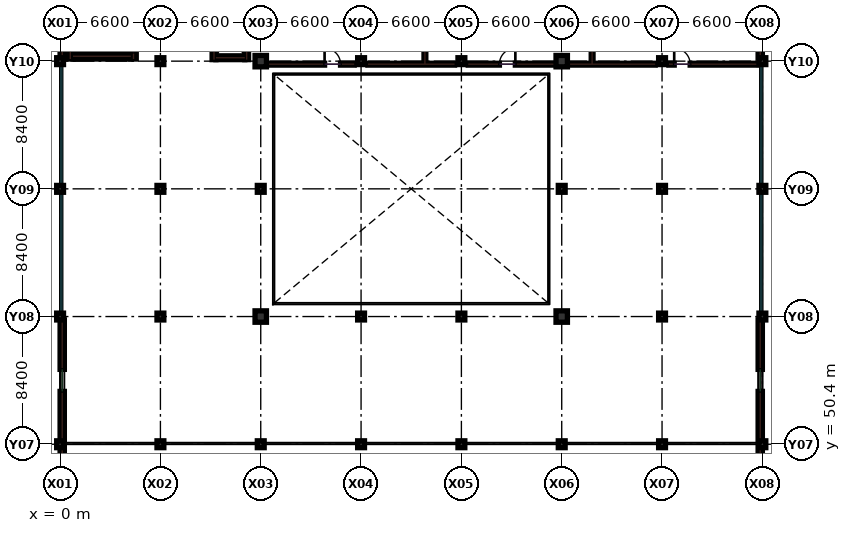
"""IFC4 building model, lengths in metres.
Left out: names, types, materials, properties, quantities, classifications, styles, units other than length and angle.
Written with IfcOpenShell. Run it as: python <this file> out.ifc"""

import sys

from ifc_helpers import new_model, si_unit, direction, frame, frame_2d, origin, origin_2d, place, context, subcontext, project, spatial, rectangle, circle, extrude, element, fill, save


model = new_model("IFC4")
c1 = context("Model", 3, precision=1e-05, world=origin(), true_north=direction((0.0, 1.0)))
c2 = subcontext(c1, "Body", "Model", "MODEL_VIEW")
j1 = project(units=[si_unit("LENGTHUNIT", "METRE"), si_unit("PLANEANGLEUNIT", "RADIAN")], contexts=[c1])
p1 = place(None, origin())
s1 = spatial("IfcSite", under=j1, at=p1, CompositionType="ELEMENT")
p2 = place(p1, origin())
s2 = spatial("IfcBuilding", under=s1, at=p2, CompositionType="ELEMENT")
p3 = place(p2, frame((0.0, 0.0, 14.4)))
s3 = spatial("IfcBuildingStorey", under=s2, at=p3, CompositionType="ELEMENT", Elevation=14.4)
for number, where, z_axis, x_axis in (
    (1, (0.0, 50.4, 0.0), (0.0, 0.0, 1.0), (1.0, 0.0, 0.0)),
    (2, (0.0, 58.8, 0.0), (0.0, 0.0, 1.0), (1.0, 0.0, 0.0)),
    (3, (0.0, 67.2, 0.0), (0.0, 0.0, 1.0), (1.0, 0.0, 0.0)),
    (4, (0.0, 75.6, 0.0), (0.0, 0.0, 1.0), (1.0, 0.0, 0.0)),
    (5, (6.6, 50.4, 0.0), (0.0, 0.0, 1.0), (1.0, 0.0, 0.0)),
    (6, (6.6, 58.8, 0.0), (0.0, 0.0, 1.0), (1.0, 0.0, 0.0)),
    (7, (6.6, 67.2, 0.0), (0.0, 0.0, 1.0), (1.0, 0.0, 0.0)),
    (8, (6.6, 75.6, 0.0), (0.0, 0.0, 1.0), (1.0, 0.0, 0.0)),
    (9, (13.2, 50.4, 0.0), (0.0, 0.0, 1.0), (1.0, 0.0, 0.0)),
):
    element("IfcColumn", number, at=place(p3, frame(where, z_axis=z_axis, x_axis=x_axis)), inside=s3, PredefinedType="COLUMN", context=c2, shape_type="SweptSolid", body=[
        extrude(rectangle(XDim=0.45, YDim=0.45, at=origin_2d()), origin(), (0.0, 0.0, 1.0), 4.2),
    ])
p4 = place(p3, frame((13.2, 58.8, 0.0), z_axis=(0.0, 0.0, 1.0), x_axis=(1.0, 0.0, 0.0)))
e10 = element("IfcColumn", 10, at=p4, inside=s3, PredefinedType="COLUMN", context=c2, shape_type="SweptSolid", body=[
    extrude(circle(Radius=0.375, at=origin_2d()), origin(), (0.0, 0.0, 1.0), 4.2),
])
p5 = place(p3, frame((13.2, 67.2, 0.0), z_axis=(0.0, 0.0, 1.0), x_axis=(1.0, 0.0, 0.0)))
e11 = element("IfcColumn", 11, at=p5, inside=s3, PredefinedType="COLUMN", context=c2, shape_type="SweptSolid", body=[
    extrude(rectangle(XDim=0.45, YDim=0.45, at=origin_2d()), origin(), (0.0, 0.0, 1.0), 4.2),
])
p6 = place(p3, frame((13.2, 75.6, 0.0), z_axis=(0.0, 0.0, 1.0), x_axis=(1.0, 0.0, 0.0)))
e12 = element("IfcColumn", 12, at=p6, inside=s3, PredefinedType="COLUMN", context=c2, shape_type="SweptSolid", body=[
    extrude(circle(Radius=0.375, at=origin_2d()), origin(), (0.0, 0.0, 1.0), 4.2),
])
for number, where, z_axis, x_axis in (
    (13, (19.8, 50.4, 0.0), (0.0, 0.0, 1.0), (1.0, 0.0, 0.0)),
    (14, (19.8, 58.8, 0.0), (0.0, 0.0, 1.0), (1.0, 0.0, 0.0)),
    (15, (19.8, 75.6, 0.0), (0.0, 0.0, 1.0), (1.0, 0.0, 0.0)),
    (16, (26.4, 50.4, 0.0), (0.0, 0.0, 1.0), (1.0, 0.0, 0.0)),
    (17, (26.4, 58.8, 0.0), (0.0, 0.0, 1.0), (1.0, 0.0, 0.0)),
    (18, (26.4, 75.6, 0.0), (0.0, 0.0, 1.0), (1.0, 0.0, 0.0)),
    (19, (33.0, 50.4, 0.0), (0.0, 0.0, 1.0), (1.0, 0.0, 0.0)),
):
    element("IfcColumn", number, at=place(p3, frame(where, z_axis=z_axis, x_axis=x_axis)), inside=s3, PredefinedType="COLUMN", context=c2, shape_type="SweptSolid", body=[
        extrude(rectangle(XDim=0.45, YDim=0.45, at=origin_2d()), origin(), (0.0, 0.0, 1.0), 4.2),
    ])
p7 = place(p3, frame((33.0, 58.8, 0.0), z_axis=(0.0, 0.0, 1.0), x_axis=(1.0, 0.0, 0.0)))
e20 = element("IfcColumn", 20, at=p7, inside=s3, PredefinedType="COLUMN", context=c2, shape_type="SweptSolid", body=[
    extrude(circle(Radius=0.375, at=origin_2d()), origin(), (0.0, 0.0, 1.0), 4.2),
])
p8 = place(p3, frame((33.0, 67.2, 0.0), z_axis=(0.0, 0.0, 1.0), x_axis=(1.0, 0.0, 0.0)))
e21 = element("IfcColumn", 21, at=p8, inside=s3, PredefinedType="COLUMN", context=c2, shape_type="SweptSolid", body=[
    extrude(rectangle(XDim=0.45, YDim=0.45, at=origin_2d()), origin(), (0.0, 0.0, 1.0), 4.2),
])
p9 = place(p3, frame((33.0, 75.6, 0.0), z_axis=(0.0, 0.0, 1.0), x_axis=(1.0, 0.0, 0.0)))
e22 = element("IfcColumn", 22, at=p9, inside=s3, PredefinedType="COLUMN", context=c2, shape_type="SweptSolid", body=[
    extrude(circle(Radius=0.375, at=origin_2d()), origin(), (0.0, 0.0, 1.0), 4.2),
])
for number, where, z_axis, x_axis in (
    (23, (39.6, 50.4, 0.0), (0.0, 0.0, 1.0), (1.0, 0.0, 0.0)),
    (24, (39.6, 58.8, 0.0), (0.0, 0.0, 1.0), (1.0, 0.0, 0.0)),
    (25, (39.6, 67.2, 0.0), (0.0, 0.0, 1.0), (1.0, 0.0, 0.0)),
    (26, (39.6, 75.6, 0.0), (0.0, 0.0, 1.0), (1.0, 0.0, 0.0)),
    (27, (46.2, 50.4, 0.0), (0.0, 0.0, 1.0), (1.0, 0.0, 0.0)),
    (28, (46.2, 58.8, 0.0), (0.0, 0.0, 1.0), (1.0, 0.0, 0.0)),
    (29, (46.2, 67.2, 0.0), (0.0, 0.0, 1.0), (1.0, 0.0, 0.0)),
    (30, (46.2, 75.6, 0.0), (0.0, 0.0, 1.0), (1.0, 0.0, 0.0)),
):
    element("IfcColumn", number, at=place(p3, frame(where, z_axis=z_axis, x_axis=x_axis)), inside=s3, PredefinedType="COLUMN", context=c2, shape_type="SweptSolid", body=[
        extrude(rectangle(XDim=0.45, YDim=0.45, at=origin_2d()), origin(), (0.0, 0.0, 1.0), 4.2),
    ])
p10 = place(p3, frame((12.9, 75.4, 0.0), z_axis=(0.0, 0.0, 1.0), x_axis=(1.0, 0.0, 0.0)))
e31 = element("IfcWall", 31, at=p10, inside=s3, PredefinedType="PARTITIONING", context=c2, shape_type="SweptSolid", body=[
    extrude(rectangle(XDim=6.45, YDim=0.12, at=frame_2d((3.225, 0.0))), origin(), (0.0, 0.0, 1.0), 3.19),
])
p11 = place(p10, frame((4.5, 0.0, 0.0)))
e32 = element("IfcOpeningElement", 32, at=p11, cuts=e31, PredefinedType="OPENING", context=c2, shape_type="SweptSolid", body=[
    extrude(rectangle(XDim=1.05, YDim=2.15, at=frame_2d((0.525, 1.075))), frame((0.0, 0.07, 0.0), z_axis=(0.0, -1.0, 0.0), x_axis=(1.0, 0.0, 0.0)), (0.0, 0.0, 1.0), 0.14),
])
p12 = place(p3, frame((20.25, 75.4, 0.0), z_axis=(0.0, 0.0, 1.0), x_axis=(1.0, 0.0, 0.0)))
e33 = element("IfcWall", 33, at=p12, inside=s3, PredefinedType="PARTITIONING", context=c2, shape_type="SweptSolid", body=[
    extrude(rectangle(XDim=5.7, YDim=0.12, at=frame_2d((2.85, 0.0))), origin(), (0.0, 0.0, 1.0), 3.19),
])
p13 = place(p3, frame((26.85, 75.4, 0.0), z_axis=(0.0, 0.0, 1.0), x_axis=(1.0, 0.0, 0.0)))
e34 = element("IfcWall", 34, at=p13, inside=s3, PredefinedType="PARTITIONING", context=c2, shape_type="SweptSolid", body=[
    extrude(rectangle(XDim=5.7, YDim=0.12, at=frame_2d((2.85, 0.0))), origin(), (0.0, 0.0, 1.0), 3.19),
])
p14 = place(p13, frame((2.05, 0.0, 0.0)))
e35 = element("IfcOpeningElement", 35, at=p14, cuts=e34, PredefinedType="OPENING", context=c2, shape_type="SweptSolid", body=[
    extrude(rectangle(XDim=1.05, YDim=2.15, at=frame_2d((0.525, 1.075))), frame((0.0, 0.07, 0.0), z_axis=(0.0, -1.0, 0.0), x_axis=(1.0, 0.0, 0.0)), (0.0, 0.0, 1.0), 0.14),
])
p15 = place(p3, frame((33.45, 75.4, 0.0), z_axis=(0.0, 0.0, 1.0), x_axis=(1.0, 0.0, 0.0)))
e36 = element("IfcWall", 36, at=p15, inside=s3, PredefinedType="PARTITIONING", context=c2, shape_type="SweptSolid", body=[
    extrude(rectangle(XDim=5.7, YDim=0.12, at=frame_2d((2.85, 0.0))), origin(), (0.0, 0.0, 1.0), 3.19),
])
p16 = place(p3, frame((40.05, 75.4, 0.0), z_axis=(0.0, 0.0, 1.0), x_axis=(1.0, 0.0, 0.0)))
e37 = element("IfcWall", 37, at=p16, inside=s3, PredefinedType="PARTITIONING", context=c2, shape_type="SweptSolid", body=[
    extrude(rectangle(XDim=5.9, YDim=0.12, at=frame_2d((2.95, 0.0))), origin(), (0.0, 0.0, 1.0), 3.19),
])
p17 = place(p16, frame((0.35, 0.0, 0.0)))
e38 = element("IfcOpeningElement", 38, at=p17, cuts=e37, PredefinedType="OPENING", context=c2, shape_type="SweptSolid", body=[
    extrude(rectangle(XDim=1.05, YDim=2.15, at=frame_2d((0.525, 1.075))), frame((0.0, 0.07, 0.0), z_axis=(0.0, -1.0, 0.0), x_axis=(1.0, 0.0, 0.0)), (0.0, 0.0, 1.0), 0.14),
])
p18 = place(p3, frame((24.0, 75.4, 0.0), z_axis=(0.0, 0.0, 1.0), x_axis=(0.0, 1.0, 0.0)))
e39 = element("IfcWall", 39, at=p18, inside=s3, PredefinedType="PARTITIONING", context=c2, shape_type="SweptSolid", body=[
    extrude(rectangle(XDim=8.46, YDim=0.12, at=frame_2d((4.23, 0.0))), origin(), (0.0, 0.0, 1.0), 3.19),
])
p19 = place(p18, frame((4.0, 0.0, 0.0)))
e40 = element("IfcOpeningElement", 40, at=p19, cuts=e39, PredefinedType="OPENING", context=c2, shape_type="SweptSolid", body=[
    extrude(rectangle(XDim=1.0, YDim=2.2, at=frame_2d((0.5, 1.1))), frame((0.0, 0.07, 0.0), z_axis=(0.0, -1.0, 0.0), x_axis=(1.0, 0.0, 0.0)), (0.0, 0.0, 1.0), 0.14),
])
p20 = place(p3, frame((35.0, 75.4, 0.0), z_axis=(0.0, 0.0, 1.0), x_axis=(0.0, 1.0, 0.0)))
e41 = element("IfcWall", 41, at=p20, inside=s3, PredefinedType="PARTITIONING", context=c2, shape_type="SweptSolid", body=[
    extrude(rectangle(XDim=8.46, YDim=0.12, at=frame_2d((4.23, 0.0))), origin(), (0.0, 0.0, 1.0), 3.19),
])
p21 = place(p20, frame((4.0, 0.0, 0.0)))
e42 = element("IfcOpeningElement", 42, at=p21, cuts=e41, PredefinedType="OPENING", context=c2, shape_type="SweptSolid", body=[
    extrude(rectangle(XDim=0.9, YDim=2.1, at=frame_2d((0.45, 1.05))), frame((0.0, 0.07, 0.0), z_axis=(0.0, -1.0, 0.0), x_axis=(1.0, 0.0, 0.0)), (0.0, 0.0, 1.0), 0.14),
])
p22 = place(p3, frame((0.14, 58.58, 0.0), z_axis=(0.0, 0.0, 1.0), x_axis=(0.0, -1.0, 0.0)))
e43 = element("IfcWall", 43, at=p22, inside=s3, PredefinedType="SOLIDWALL", context=c2, shape_type="SweptSolid", body=[
    extrude(rectangle(XDim=7.96, YDim=0.28, at=frame_2d((3.98, 0.0))), origin(), (0.0, 0.0, 1.0), 3.325),
])
p23 = place(p22, frame((3.255, 0.0, 0.95)))
e44 = element("IfcOpeningElement", 44, at=p23, cuts=e43, PredefinedType="OPENING", context=c2, shape_type="SweptSolid", body=[
    extrude(rectangle(XDim=1.45, YDim=1.6, at=frame_2d((0.725, 0.8))), frame((0.0, 0.15, 0.0), z_axis=(0.0, -1.0, 0.0), x_axis=(1.0, 0.0, 0.0)), (0.0, 0.0, 1.0), 0.3),
])
p24 = place(p3, frame((0.14, 83.78, 0.0), z_axis=(0.0, 0.0, 1.0), x_axis=(0.0, -1.0, 0.0)))
e45 = element("IfcWall", 45, at=p24, inside=s3, PredefinedType="SOLIDWALL", context=c2, shape_type="SweptSolid", body=[
    extrude(rectangle(XDim=7.96, YDim=0.28, at=frame_2d((3.98, 0.0))), origin(), (0.0, 0.0, 1.0), 2.605),
])
p25 = place(p24, frame((3.53, 0.0, 0.95)))
e46 = element("IfcOpeningElement", 46, at=p25, cuts=e45, PredefinedType="OPENING", context=c2, shape_type="SweptSolid", body=[
    extrude(rectangle(XDim=0.9, YDim=1.4, at=frame_2d((0.45, 0.7))), frame((0.0, 0.15, 0.0), z_axis=(0.0, -1.0, 0.0), x_axis=(1.0, 0.0, 0.0)), (0.0, 0.0, 1.0), 0.3),
])
p26 = place(p3, frame((46.06, 50.62, 0.0), z_axis=(0.0, 0.0, 1.0), x_axis=(0.0, 1.0, 0.0)))
e47 = element("IfcWall", 47, at=p26, inside=s3, PredefinedType="SOLIDWALL", context=c2, shape_type="SweptSolid", body=[
    extrude(rectangle(XDim=7.96, YDim=0.28, at=frame_2d((3.98, 0.0))), origin(), (0.0, 0.0, 1.0), 3.325),
])
p27 = place(p26, frame((3.255, 0.0, 0.95)))
e48 = element("IfcOpeningElement", 48, at=p27, cuts=e47, PredefinedType="OPENING", context=c2, shape_type="SweptSolid", body=[
    extrude(rectangle(XDim=1.45, YDim=1.6, at=frame_2d((0.725, 0.8))), frame((0.0, 0.15, 0.0), z_axis=(0.0, -1.0, 0.0), x_axis=(1.0, 0.0, 0.0)), (0.0, 0.0, 1.0), 0.3),
])
p28 = place(p3, frame((46.06, 75.82, 0.0), z_axis=(0.0, 0.0, 1.0), x_axis=(0.0, 1.0, 0.0)))
e49 = element("IfcWall", 49, at=p28, inside=s3, PredefinedType="SOLIDWALL", context=c2, shape_type="SweptSolid", body=[
    extrude(rectangle(XDim=7.96, YDim=0.28, at=frame_2d((3.98, 0.0))), origin(), (0.0, 0.0, 1.0), 2.605),
])
p29 = place(p28, frame((3.53, 0.0, 0.95)))
e50 = element("IfcOpeningElement", 50, at=p29, cuts=e49, PredefinedType="OPENING", context=c2, shape_type="SweptSolid", body=[
    extrude(rectangle(XDim=0.9, YDim=1.4, at=frame_2d((0.45, 0.7))), frame((0.0, 0.15, 0.0), z_axis=(0.0, -1.0, 0.0), x_axis=(1.0, 0.0, 0.0)), (0.0, 0.0, 1.0), 0.3),
])
p30 = place(p3, frame((0.14, 50.18, -0.26), z_axis=(0.0, 0.0, 1.0), x_axis=(0.0, -1.0, 0.0)))
e51 = element("IfcWall", 51, at=p30, inside=s3, PredefinedType="SOLIDWALL", context=c2, shape_type="SweptSolid", body=[
    extrude(rectangle(XDim=7.96, YDim=0.28, at=frame_2d((3.98, 0.0))), origin(), (0.0, 0.0, 1.0), 3.585),
])
p31 = place(p30, frame((1.88, 0.0, 1.45)))
e52 = element("IfcOpeningElement", 52, at=p31, cuts=e51, PredefinedType="OPENING", context=c2, shape_type="SweptSolid", body=[
    extrude(rectangle(XDim=4.2, YDim=1.1, at=frame_2d((2.1, 0.55))), frame((0.0, 0.15, 0.0), z_axis=(0.0, -1.0, 0.0), x_axis=(1.0, 0.0, 0.0)), (0.0, 0.0, 1.0), 0.3),
])
p32 = place(p3, frame((46.06, 42.22, -0.26), z_axis=(0.0, 0.0, 1.0), x_axis=(0.0, 1.0, 0.0)))
e53 = element("IfcWall", 53, at=p32, inside=s3, PredefinedType="SOLIDWALL", context=c2, shape_type="SweptSolid", body=[
    extrude(rectangle(XDim=7.96, YDim=0.28, at=frame_2d((3.98, 0.0))), origin(), (0.0, 0.0, 1.0), 3.585),
])
p33 = place(p32, frame((1.88, 0.0, 1.45)))
e54 = element("IfcOpeningElement", 54, at=p33, cuts=e53, PredefinedType="OPENING", context=c2, shape_type="SweptSolid", body=[
    extrude(rectangle(XDim=4.2, YDim=1.1, at=frame_2d((2.1, 0.55))), frame((0.0, 0.15, 0.0), z_axis=(0.0, -1.0, 0.0), x_axis=(1.0, 0.0, 0.0)), (0.0, 0.0, 1.0), 0.3),
])
p34 = place(p3, frame((0.67, 75.74, 0.0), z_axis=(0.0, 0.0, 1.0), x_axis=(0.0, 1.0, 0.0)))
e55 = element("IfcWall", 55, at=p34, inside=s3, PredefinedType="SHEAR", context=c2, shape_type="SweptSolid", body=[
    extrude(rectangle(XDim=8.09, YDim=0.36, at=frame_2d((4.045, 0.0))), origin(), (0.0, 0.0, 1.0), 3.94),
])
p35 = place(p3, frame((4.83, 75.74, 0.0), z_axis=(0.0, 0.0, 1.0), x_axis=(0.0, 1.0, 0.0)))
e56 = element("IfcWall", 56, at=p35, inside=s3, PredefinedType="SHEAR", context=c2, shape_type="SweptSolid", body=[
    extrude(rectangle(XDim=8.09, YDim=0.36, at=frame_2d((4.045, 0.0))), origin(), (0.0, 0.0, 1.0), 3.94),
])
p36 = place(p35, frame((0.45, 0.0, 0.0)))
e57 = element("IfcOpeningElement", 57, at=p36, cuts=e56, PredefinedType="OPENING", context=c2, shape_type="SweptSolid", body=[
    extrude(rectangle(XDim=1.25, YDim=2.15, at=frame_2d((0.625, 1.075))), frame((0.0, 0.19, 0.0), z_axis=(0.0, -1.0, 0.0), x_axis=(1.0, 0.0, 0.0)), (0.0, 0.0, 1.0), 0.38),
])
p37 = place(p3, frame((0.85, 75.92, 0.0), z_axis=(0.0, 0.0, 1.0), x_axis=(1.0, 0.0, 0.0)))
e58 = element("IfcWall", 58, at=p37, inside=s3, PredefinedType="SHEAR", context=c2, shape_type="SweptSolid", body=[
    extrude(rectangle(XDim=3.8, YDim=0.36, at=frame_2d((1.9, 0.0))), origin(), (0.0, 0.0, 1.0), 3.94),
])
p38 = place(p3, frame((10.125, 75.7, 0.0), z_axis=(0.0, 0.0, 1.0), x_axis=(0.0, 1.0, 0.0)))
e59 = element("IfcWall", 59, at=p38, inside=s3, PredefinedType="SHEAR", context=c2, shape_type="SweptSolid", body=[
    extrude(rectangle(XDim=3.2, YDim=0.25, at=frame_2d((1.6, 0.0))), origin(), (0.0, 0.0, 1.0), 3.94),
])
p39 = place(p38, frame((1.05, 0.0, 0.0)))
e60 = element("IfcOpeningElement", 60, at=p39, cuts=e59, PredefinedType="OPENING", context=c2, shape_type="SweptSolid", body=[
    extrude(rectangle(XDim=1.1, YDim=2.15, at=frame_2d((0.55, 1.075))), frame((0.0, 0.135, 0.0), z_axis=(0.0, -1.0, 0.0), x_axis=(1.0, 0.0, 0.0)), (0.0, 0.0, 1.0), 0.27),
])
p40 = place(p3, frame((12.275, 75.7, 0.0), z_axis=(0.0, 0.0, 1.0), x_axis=(0.0, 1.0, 0.0)))
e61 = element("IfcWall", 61, at=p40, inside=s3, PredefinedType="SHEAR", context=c2, shape_type="SweptSolid", body=[
    extrude(rectangle(XDim=3.2, YDim=0.25, at=frame_2d((1.6, 0.0))), origin(), (0.0, 0.0, 1.0), 3.94),
])
p41 = place(p3, frame((10.25, 75.825, 0.0), z_axis=(0.0, 0.0, 1.0), x_axis=(1.0, 0.0, 0.0)))
e62 = element("IfcWall", 62, at=p41, inside=s3, PredefinedType="SHEAR", context=c2, shape_type="SweptSolid", body=[
    extrude(rectangle(XDim=1.9, YDim=0.25, at=frame_2d((0.95, 0.0))), origin(), (0.0, 0.0, 1.0), 3.94),
])
p42 = place(p11, origin())
e63 = element("IfcDoor", 63, at=p42, inside=s3, OperationType="SINGLE_SWING_LEFT", PredefinedType="DOOR", context=c2, shape_type="SweptSolid", body=[
    extrude(rectangle(XDim=1.05, YDim=2.15, at=frame_2d((0.525, 1.075))), frame((0.0, 0.025, 0.0), z_axis=(0.0, -1.0, 0.0), x_axis=(1.0, 0.0, 0.0)), (0.0, 0.0, 1.0), 0.05),
])
fill(e32, e63)
p43 = place(p14, origin())
e64 = element("IfcDoor", 64, at=p43, inside=s3, OperationType="SINGLE_SWING_RIGHT", PredefinedType="DOOR", context=c2, shape_type="SweptSolid", body=[
    extrude(rectangle(XDim=1.05, YDim=2.15, at=frame_2d((0.525, 1.075))), frame((0.0, 0.025, 0.0), z_axis=(0.0, -1.0, 0.0), x_axis=(1.0, 0.0, 0.0)), (0.0, 0.0, 1.0), 0.05),
])
fill(e35, e64)
p44 = place(p17, origin())
e65 = element("IfcDoor", 65, at=p44, inside=s3, OperationType="SINGLE_SWING_LEFT", PredefinedType="DOOR", context=c2, shape_type="SweptSolid", body=[
    extrude(rectangle(XDim=1.05, YDim=2.15, at=frame_2d((0.525, 1.075))), frame((0.0, 0.025, 0.0), z_axis=(0.0, -1.0, 0.0), x_axis=(1.0, 0.0, 0.0)), (0.0, 0.0, 1.0), 0.05),
])
fill(e38, e65)
p45 = place(p23, origin())
e66 = element("IfcWindow", 66, at=p45, inside=s3, PartitioningType="SINGLE_PANEL", PredefinedType="WINDOW", context=c2, shape_type="SweptSolid", body=[
    extrude(rectangle(XDim=1.45, YDim=1.6, at=frame_2d((0.725, 0.8))), frame((0.0, 0.03, 0.0), z_axis=(0.0, -1.0, 0.0), x_axis=(1.0, 0.0, 0.0)), (0.0, 0.0, 1.0), 0.06),
])
fill(e44, e66)
p46 = place(p27, origin())
e67 = element("IfcWindow", 67, at=p46, inside=s3, PartitioningType="SINGLE_PANEL", PredefinedType="WINDOW", context=c2, shape_type="SweptSolid", body=[
    extrude(rectangle(XDim=1.45, YDim=1.6, at=frame_2d((0.725, 0.8))), frame((0.0, 0.03, 0.0), z_axis=(0.0, -1.0, 0.0), x_axis=(1.0, 0.0, 0.0)), (0.0, 0.0, 1.0), 0.06),
])
fill(e48, e67)
p47 = place(p36, origin())
e68 = element("IfcDoor", 68, at=p47, inside=s3, OperationType="SINGLE_SWING_LEFT", PredefinedType="DOOR", context=c2, shape_type="SweptSolid", body=[
    extrude(rectangle(XDim=1.25, YDim=2.15, at=frame_2d((0.625, 1.075))), frame((0.0, 0.025, 0.0), z_axis=(0.0, -1.0, 0.0), x_axis=(1.0, 0.0, 0.0)), (0.0, 0.0, 1.0), 0.05),
])
fill(e57, e68)
save(model, sys.argv[1])
